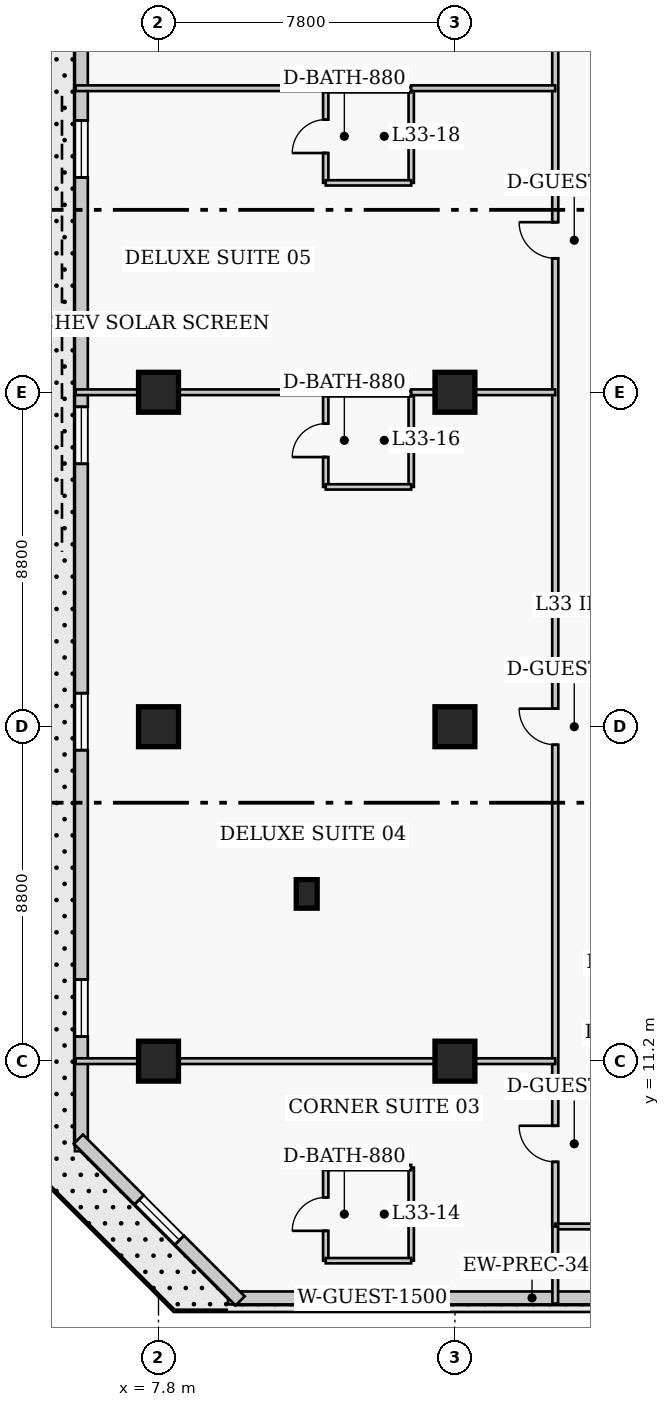
"""IFC4 building model, lengths in metres.
Left out: names, types, materials, properties, quantities, classifications, styles, units other than length and angle.
Written with IfcOpenShell. Run it as: python <this file> out.ifc"""

import sys

from ifc_helpers import new_model, si_unit, direction, frame, frame_2d, origin, origin_2d, place, context, subcontext, project, spatial, rectangle, extrude, element, fill, save


model = new_model("IFC4")
c1 = context("Model", 3, precision=1e-05, world=origin(), true_north=direction((0.0, 1.0)))
c2 = subcontext(c1, "Body", "Model", "MODEL_VIEW")
j1 = project(units=[si_unit("LENGTHUNIT", "METRE"), si_unit("PLANEANGLEUNIT", "RADIAN")], contexts=[c1])
p1 = place(None, origin())
s1 = spatial("IfcSite", under=j1, at=p1, CompositionType="ELEMENT")
p2 = place(p1, origin())
s2 = spatial("IfcBuilding", under=s1, at=p2, CompositionType="ELEMENT")
p3 = place(p2, frame((0.0, 0.0, 134.6)))
s3 = spatial("IfcBuildingStorey", under=s2, at=p3, CompositionType="ELEMENT", Elevation=134.6)
for number, where, z_axis, x_axis in (
    (1, (7.8, 11.2, 0.0), (0.0, 0.0, 1.0), (1.0, 0.0, 0.0)),
    (2, (7.8, 20.0, 0.0), (0.0, 0.0, 1.0), (1.0, 0.0, 0.0)),
    (3, (7.8, 28.8, 0.0), (0.0, 0.0, 1.0), (1.0, 0.0, 0.0)),
    (4, (15.6, 11.2, 0.0), (0.0, 0.0, 1.0), (1.0, 0.0, 0.0)),
    (5, (15.6, 20.0, 0.0), (0.0, 0.0, 1.0), (1.0, 0.0, 0.0)),
    (6, (15.6, 28.8, 0.0), (0.0, 0.0, 1.0), (1.0, 0.0, 0.0)),
):
    element("IfcColumn", number, at=place(p3, frame(where, z_axis=z_axis, x_axis=x_axis)), inside=s3, PredefinedType="COLUMN", context=c2, shape_type="SweptSolid", body=[
        extrude(rectangle(XDim=1.05, YDim=1.05, at=origin_2d()), origin(), (0.0, 0.0, 1.0), 3.8),
    ])
p4 = place(p3, frame((11.7, 15.6, 0.0), z_axis=(0.0, 0.0, 1.0), x_axis=(1.0, 0.0, 0.0)))
e7 = element("IfcColumn", 7, at=p4, inside=s3, PredefinedType="PILASTER", context=c2, shape_type="SweptSolid", body=[
    extrude(rectangle(XDim=0.55, YDim=0.75, at=origin_2d()), origin(), (0.0, 0.0, 1.0), 3.8),
])
p5 = place(p3, frame((9.63, 4.97, 0.0), z_axis=(0.0, 0.0, 1.0), x_axis=(1.0, 0.0, 0.0)))
e8 = element("IfcWall", 8, at=p5, inside=s3, PredefinedType="SOLIDWALL", context=c2, shape_type="SweptSolid", body=[
    extrude(rectangle(XDim=26.69, YDim=0.34, at=frame_2d((13.345, 0.0))), origin(), (0.0, 0.0, 1.0), 3.55),
])
p6 = place(p5, frame((3.048, 0.0, 0.85)))
e9 = element("IfcOpeningElement", 9, at=p6, cuts=e8, PredefinedType="OPENING", context=c2, shape_type="SweptSolid", body=[
    extrude(rectangle(XDim=1.5, YDim=1.75, at=frame_2d((0.75, 0.875))), frame((0.0, 0.18, 0.0), z_axis=(0.0, -1.0, 0.0), x_axis=(1.0, 0.0, 0.0)), (0.0, 0.0, 1.0), 0.36),
])
p7 = place(p5, frame((22.642, 0.0, 0.85)))
e10 = element("IfcOpeningElement", 10, at=p7, cuts=e8, PredefinedType="OPENING", context=c2, shape_type="SweptSolid", body=[
    extrude(rectangle(XDim=1.5, YDim=1.75, at=frame_2d((0.75, 0.875))), frame((0.0, 0.18, 0.0), z_axis=(0.0, -1.0, 0.0), x_axis=(1.0, 0.0, 0.0)), (0.0, 0.0, 1.0), 0.36),
])
p8 = place(p5, frame((11.45, 0.0, 0.85)))
e11 = element("IfcOpeningElement", 11, at=p8, cuts=e8, PredefinedType="OPENING", context=c2, shape_type="SweptSolid", body=[
    extrude(rectangle(XDim=1.3, YDim=1.7, at=frame_2d((0.65, 0.85))), frame((0.0, 0.18, 0.0), z_axis=(0.0, -1.0, 0.0), x_axis=(1.0, 0.0, 0.0)), (0.0, 0.0, 1.0), 0.36),
])
p9 = place(p5, frame((17.955, 0.0, 0.85)))
e12 = element("IfcOpeningElement", 12, at=p9, cuts=e8, PredefinedType="OPENING", context=c2, shape_type="SweptSolid", body=[
    extrude(rectangle(XDim=1.3, YDim=1.7, at=frame_2d((0.65, 0.85))), frame((0.0, 0.18, 0.0), z_axis=(0.0, -1.0, 0.0), x_axis=(1.0, 0.0, 0.0)), (0.0, 0.0, 1.0), 0.36),
])
p10 = place(p3, frame((5.77, 38.97, 0.0), z_axis=(0.0, 0.0, 1.0), x_axis=(0.0, -1.0, 0.0)))
e13 = element("IfcWall", 13, at=p10, inside=s3, PredefinedType="SOLIDWALL", context=c2, shape_type="SweptSolid", body=[
    extrude(rectangle(XDim=30.14, YDim=0.34, at=frame_2d((15.07, 0.0))), origin(), (0.0, 0.0, 1.0), 3.55),
])
p11 = place(p10, frame((3.018, 0.0, 0.85)))
e14 = element("IfcOpeningElement", 14, at=p11, cuts=e13, PredefinedType="OPENING", context=c2, shape_type="SweptSolid", body=[
    extrude(rectangle(XDim=1.5, YDim=1.75, at=frame_2d((0.75, 0.875))), frame((0.0, 0.18, 0.0), z_axis=(0.0, -1.0, 0.0), x_axis=(1.0, 0.0, 0.0)), (0.0, 0.0, 1.0), 0.36),
])
p12 = place(p10, frame((10.552, 0.0, 0.85)))
e15 = element("IfcOpeningElement", 15, at=p12, cuts=e13, PredefinedType="OPENING", context=c2, shape_type="SweptSolid", body=[
    extrude(rectangle(XDim=1.5, YDim=1.75, at=frame_2d((0.75, 0.875))), frame((0.0, 0.18, 0.0), z_axis=(0.0, -1.0, 0.0), x_axis=(1.0, 0.0, 0.0)), (0.0, 0.0, 1.0), 0.36),
])
p13 = place(p10, frame((18.087, 0.0, 0.85)))
e16 = element("IfcOpeningElement", 16, at=p13, cuts=e13, PredefinedType="OPENING", context=c2, shape_type="SweptSolid", body=[
    extrude(rectangle(XDim=1.5, YDim=1.75, at=frame_2d((0.75, 0.875))), frame((0.0, 0.18, 0.0), z_axis=(0.0, -1.0, 0.0), x_axis=(1.0, 0.0, 0.0)), (0.0, 0.0, 1.0), 0.36),
])
p14 = place(p10, frame((25.623, 0.0, 0.85)))
e17 = element("IfcOpeningElement", 17, at=p14, cuts=e13, PredefinedType="OPENING", context=c2, shape_type="SweptSolid", body=[
    extrude(rectangle(XDim=1.5, YDim=1.75, at=frame_2d((0.75, 0.875))), frame((0.0, 0.18, 0.0), z_axis=(0.0, -1.0, 0.0), x_axis=(1.0, 0.0, 0.0)), (0.0, 0.0, 1.0), 0.36),
])
p15 = place(p3, frame((5.692, 9.148, 0.0), z_axis=(0.0, 0.0, 1.0), x_axis=(0.707106781187, -0.707106781187, 0.0)))
e18 = element("IfcWall", 18, at=p15, inside=s3, PredefinedType="SOLIDWALL", context=c2, shape_type="SweptSolid", body=[
    extrude(rectangle(XDim=6.02, YDim=0.34, at=frame_2d((3.01, 0.0))), origin(), (0.0, 0.0, 1.0), 3.55),
])
p16 = place(p15, frame((2.26, 0.0, 0.85)))
e19 = element("IfcOpeningElement", 19, at=p16, cuts=e18, PredefinedType="OPENING", context=c2, shape_type="SweptSolid", body=[
    extrude(rectangle(XDim=1.5, YDim=1.75, at=frame_2d((0.75, 0.875))), frame((0.0, 0.18, 0.0), z_axis=(0.0, -1.0, 0.0), x_axis=(1.0, 0.0, 0.0)), (0.0, 0.0, 1.0), 0.36),
])
p17 = place(p3, frame((18.24, 6.85, 0.0), z_axis=(0.0, 0.0, 1.0), x_axis=(0.0, 1.0, 0.0)))
e20 = element("IfcWall", 20, at=p17, inside=s3, PredefinedType="PARTITIONING", context=c2, shape_type="SweptSolid", body=[
    extrude(rectangle(XDim=33.8, YDim=0.16, at=frame_2d((16.9, 0.0))), origin(), (0.0, 0.0, 1.0), 3.55),
])
p18 = place(p17, frame((1.7, 0.0, 0.0)))
e21 = element("IfcOpeningElement", 21, at=p18, cuts=e20, PredefinedType="OPENING", context=c2, shape_type="SweptSolid", body=[
    extrude(rectangle(XDim=0.95, YDim=2.1, at=frame_2d((0.475, 1.05))), frame((0.0, 0.09, 0.0), z_axis=(0.0, -1.0, 0.0), x_axis=(1.0, 0.0, 0.0)), (0.0, 0.0, 1.0), 0.18),
])
p19 = place(p17, frame((12.675, 0.0, 0.0)))
e22 = element("IfcOpeningElement", 22, at=p19, cuts=e20, PredefinedType="OPENING", context=c2, shape_type="SweptSolid", body=[
    extrude(rectangle(XDim=0.95, YDim=2.1, at=frame_2d((0.475, 1.05))), frame((0.0, 0.09, 0.0), z_axis=(0.0, -1.0, 0.0), x_axis=(1.0, 0.0, 0.0)), (0.0, 0.0, 1.0), 0.18),
])
p20 = place(p17, frame((25.475, 0.0, 0.0)))
e23 = element("IfcOpeningElement", 23, at=p20, cuts=e20, PredefinedType="OPENING", context=c2, shape_type="SweptSolid", body=[
    extrude(rectangle(XDim=0.95, YDim=2.1, at=frame_2d((0.475, 1.05))), frame((0.0, 0.09, 0.0), z_axis=(0.0, -1.0, 0.0), x_axis=(1.0, 0.0, 0.0)), (0.0, 0.0, 1.0), 0.18),
])
p21 = place(p17, frame((31.43, 0.0, 0.0)))
e24 = element("IfcOpeningElement", 24, at=p21, cuts=e20, PredefinedType="OPENING", context=c2, shape_type="SweptSolid", body=[
    extrude(rectangle(XDim=1.0, YDim=2.15, at=frame_2d((0.5, 1.075))), frame((0.0, 0.09, 0.0), z_axis=(0.0, -1.0, 0.0), x_axis=(1.0, 0.0, 0.0)), (0.0, 0.0, 1.0), 0.18),
])
p22 = place(p3, frame((18.24, 6.85, 0.0), z_axis=(0.0, 0.0, 1.0), x_axis=(1.0, 0.0, 0.0)))
e25 = element("IfcWall", 25, at=p22, inside=s3, PredefinedType="PARTITIONING", context=c2, shape_type="SweptSolid", body=[
    extrude(rectangle(XDim=2.22, YDim=0.15, at=frame_2d((1.11, 0.0))), origin(), (0.0, 0.0, 1.0), 3.55),
])
p23 = place(p3, frame((18.24, 4.82, 0.0), z_axis=(0.0, 0.0, 1.0), x_axis=(0.0, 1.0, 0.0)))
e26 = element("IfcWall", 26, at=p23, inside=s3, PredefinedType="PARTITIONING", context=c2, shape_type="SweptSolid", body=[
    extrude(rectangle(XDim=2.03, YDim=0.15, at=frame_2d((1.015, 0.0))), origin(), (0.0, 0.0, 1.0), 3.55),
])
p24 = place(p3, frame((12.2, 5.95, 0.0), z_axis=(0.0, 0.0, 1.0), x_axis=(0.0, 1.0, 0.0)))
e27 = element("IfcWall", 27, at=p24, inside=s3, PredefinedType="PLUMBINGWALL", context=c2, shape_type="SweptSolid", body=[
    extrude(rectangle(XDim=2.45, YDim=0.14, at=frame_2d((1.225, 0.0))), origin(), (0.0, 0.0, 1.0), 3.55),
])
p25 = place(p24, frame((0.785, 0.0, 0.0)))
e28 = element("IfcOpeningElement", 28, at=p25, cuts=e27, PredefinedType="OPENING", context=c2, shape_type="SweptSolid", body=[
    extrude(rectangle(XDim=0.88, YDim=2.05, at=frame_2d((0.44, 1.025))), frame((0.0, 0.08, 0.0), z_axis=(0.0, -1.0, 0.0), x_axis=(1.0, 0.0, 0.0)), (0.0, 0.0, 1.0), 0.16),
])
p26 = place(p3, frame((14.45, 5.95, 0.0), z_axis=(0.0, 0.0, 1.0), x_axis=(0.0, 1.0, 0.0)))
e29 = element("IfcWall", 29, at=p26, inside=s3, PredefinedType="PLUMBINGWALL", context=c2, shape_type="SweptSolid", body=[
    extrude(rectangle(XDim=2.45, YDim=0.14, at=frame_2d((1.225, 0.0))), origin(), (0.0, 0.0, 1.0), 3.55),
])
for number, where, z_axis, x_axis in (
    (30, (12.2, 5.95, 0.0), (0.0, 0.0, 1.0), (1.0, 0.0, 0.0)),
    (31, (12.2, 8.4, 0.0), (0.0, 0.0, 1.0), (1.0, 0.0, 0.0)),
):
    element("IfcWall", number, at=place(p3, frame(where, z_axis=z_axis, x_axis=x_axis)), inside=s3, PredefinedType="PLUMBINGWALL", context=c2, shape_type="SweptSolid", body=[
        extrude(rectangle(XDim=2.25, YDim=0.14, at=frame_2d((1.125, 0.0))), origin(), (0.0, 0.0, 1.0), 3.55),
    ])
p27 = place(p3, frame((5.62, 11.2, 0.0), z_axis=(0.0, 0.0, 1.0), x_axis=(1.0, 0.0, 0.0)))
e32 = element("IfcWall", 32, at=p27, inside=s3, PredefinedType="PARTITIONING", context=c2, shape_type="SweptSolid", body=[
    extrude(rectangle(XDim=12.62, YDim=0.15, at=frame_2d((6.31, 0.0))), origin(), (0.0, 0.0, 1.0), 2.778),
])
p28 = place(p3, frame((12.2, 26.31, 0.0), z_axis=(0.0, 0.0, 1.0), x_axis=(0.0, 1.0, 0.0)))
e33 = element("IfcWall", 33, at=p28, inside=s3, PredefinedType="PLUMBINGWALL", context=c2, shape_type="SweptSolid", body=[
    extrude(rectangle(XDim=2.45, YDim=0.14, at=frame_2d((1.225, 0.0))), origin(), (0.0, 0.0, 1.0), 3.55),
])
p29 = place(p28, frame((0.785, 0.0, 0.0)))
e34 = element("IfcOpeningElement", 34, at=p29, cuts=e33, PredefinedType="OPENING", context=c2, shape_type="SweptSolid", body=[
    extrude(rectangle(XDim=0.88, YDim=2.05, at=frame_2d((0.44, 1.025))), frame((0.0, 0.08, 0.0), z_axis=(0.0, -1.0, 0.0), x_axis=(1.0, 0.0, 0.0)), (0.0, 0.0, 1.0), 0.16),
])
p30 = place(p3, frame((14.45, 26.31, 0.0), z_axis=(0.0, 0.0, 1.0), x_axis=(0.0, 1.0, 0.0)))
e35 = element("IfcWall", 35, at=p30, inside=s3, PredefinedType="PLUMBINGWALL", context=c2, shape_type="SweptSolid", body=[
    extrude(rectangle(XDim=2.45, YDim=0.14, at=frame_2d((1.225, 0.0))), origin(), (0.0, 0.0, 1.0), 3.55),
])
p31 = place(p3, frame((12.2, 26.31, 0.0), z_axis=(0.0, 0.0, 1.0), x_axis=(1.0, 0.0, 0.0)))
e36 = element("IfcWall", 36, at=p31, inside=s3, PredefinedType="PLUMBINGWALL", context=c2, shape_type="SweptSolid", body=[
    extrude(rectangle(XDim=2.25, YDim=0.14, at=frame_2d((1.125, 0.0))), origin(), (0.0, 0.0, 1.0), 3.55),
])
p32 = place(p3, frame((12.2, 28.76, 0.0), z_axis=(0.0, 0.0, 1.0), x_axis=(1.0, 0.0, 0.0)))
e37 = element("IfcWall", 37, at=p32, inside=s3, PredefinedType="PLUMBINGWALL", context=c2, shape_type="SweptSolid", body=[
    extrude(rectangle(XDim=2.25, YDim=0.14, at=frame_2d((1.125, 0.0))), origin(), (0.0, 0.0, 1.0), 2.9),
])
p33 = place(p3, frame((5.62, 28.8, 0.0), z_axis=(0.0, 0.0, 1.0), x_axis=(1.0, 0.0, 0.0)))
e38 = element("IfcWall", 38, at=p33, inside=s3, PredefinedType="PARTITIONING", context=c2, shape_type="SweptSolid", body=[
    extrude(rectangle(XDim=6.58, YDim=0.15, at=frame_2d((3.29, 0.0))), origin(), (0.0, 0.0, 1.0), 2.778),
])
p34 = place(p3, frame((14.45, 28.8, 0.0), z_axis=(0.0, 0.0, 1.0), x_axis=(1.0, 0.0, 0.0)))
e39 = element("IfcWall", 39, at=p34, inside=s3, PredefinedType="PARTITIONING", context=c2, shape_type="SweptSolid", body=[
    extrude(rectangle(XDim=3.79, YDim=0.15, at=frame_2d((1.895, 0.0))), origin(), (0.0, 0.0, 1.0), 2.778),
])
p35 = place(p3, frame((12.2, 34.31, 0.0), z_axis=(0.0, 0.0, 1.0), x_axis=(0.0, 1.0, 0.0)))
e40 = element("IfcWall", 40, at=p35, inside=s3, PredefinedType="PLUMBINGWALL", context=c2, shape_type="SweptSolid", body=[
    extrude(rectangle(XDim=2.45, YDim=0.14, at=frame_2d((1.225, 0.0))), origin(), (0.0, 0.0, 1.0), 3.55),
])
p36 = place(p35, frame((0.785, 0.0, 0.0)))
e41 = element("IfcOpeningElement", 41, at=p36, cuts=e40, PredefinedType="OPENING", context=c2, shape_type="SweptSolid", body=[
    extrude(rectangle(XDim=0.88, YDim=2.05, at=frame_2d((0.44, 1.025))), frame((0.0, 0.08, 0.0), z_axis=(0.0, -1.0, 0.0), x_axis=(1.0, 0.0, 0.0)), (0.0, 0.0, 1.0), 0.16),
])
p37 = place(p3, frame((14.45, 34.31, 0.0), z_axis=(0.0, 0.0, 1.0), x_axis=(0.0, 1.0, 0.0)))
e42 = element("IfcWall", 42, at=p37, inside=s3, PredefinedType="PLUMBINGWALL", context=c2, shape_type="SweptSolid", body=[
    extrude(rectangle(XDim=2.45, YDim=0.14, at=frame_2d((1.225, 0.0))), origin(), (0.0, 0.0, 1.0), 3.55),
])
for number, where, z_axis, x_axis in (
    (43, (12.2, 34.31, 0.0), (0.0, 0.0, 1.0), (1.0, 0.0, 0.0)),
    (44, (12.2, 36.76, 0.0), (0.0, 0.0, 1.0), (1.0, 0.0, 0.0)),
):
    element("IfcWall", number, at=place(p3, frame(where, z_axis=z_axis, x_axis=x_axis)), inside=s3, PredefinedType="PLUMBINGWALL", context=c2, shape_type="SweptSolid", body=[
        extrude(rectangle(XDim=2.25, YDim=0.14, at=frame_2d((1.125, 0.0))), origin(), (0.0, 0.0, 1.0), 3.55),
    ])
p38 = place(p3, frame((5.62, 36.8, 0.0), z_axis=(0.0, 0.0, 1.0), x_axis=(1.0, 0.0, 0.0)))
e45 = element("IfcWall", 45, at=p38, inside=s3, PredefinedType="PARTITIONING", context=c2, shape_type="SweptSolid", body=[
    extrude(rectangle(XDim=6.58, YDim=0.15, at=frame_2d((3.29, 0.0))), origin(), (0.0, 0.0, 1.0), 3.55),
])
p39 = place(p3, frame((14.45, 36.8, 0.0), z_axis=(0.0, 0.0, 1.0), x_axis=(1.0, 0.0, 0.0)))
e46 = element("IfcWall", 46, at=p39, inside=s3, PredefinedType="PARTITIONING", context=c2, shape_type="SweptSolid", body=[
    extrude(rectangle(XDim=3.79, YDim=0.15, at=frame_2d((1.895, 0.0))), origin(), (0.0, 0.0, 1.0), 3.55),
])
p40 = place(p6, origin())
e47 = element("IfcWindow", 47, at=p40, inside=s3, PartitioningType="SINGLE_PANEL", PredefinedType="WINDOW", context=c2, shape_type="SweptSolid", body=[
    extrude(rectangle(XDim=1.5, YDim=1.75, at=frame_2d((0.75, 0.875))), frame((0.0, 0.03, 0.0), z_axis=(0.0, -1.0, 0.0), x_axis=(1.0, 0.0, 0.0)), (0.0, 0.0, 1.0), 0.06),
])
fill(e9, e47)
p41 = place(p11, origin())
e48 = element("IfcWindow", 48, at=p41, inside=s3, PartitioningType="SINGLE_PANEL", PredefinedType="WINDOW", context=c2, shape_type="SweptSolid", body=[
    extrude(rectangle(XDim=1.5, YDim=1.75, at=frame_2d((0.75, 0.875))), frame((0.0, 0.03, 0.0), z_axis=(0.0, -1.0, 0.0), x_axis=(1.0, 0.0, 0.0)), (0.0, 0.0, 1.0), 0.06),
])
fill(e14, e48)
p42 = place(p12, origin())
e49 = element("IfcWindow", 49, at=p42, inside=s3, PartitioningType="SINGLE_PANEL", PredefinedType="WINDOW", context=c2, shape_type="SweptSolid", body=[
    extrude(rectangle(XDim=1.5, YDim=1.75, at=frame_2d((0.75, 0.875))), frame((0.0, 0.03, 0.0), z_axis=(0.0, -1.0, 0.0), x_axis=(1.0, 0.0, 0.0)), (0.0, 0.0, 1.0), 0.06),
])
fill(e15, e49)
p43 = place(p13, origin())
e50 = element("IfcWindow", 50, at=p43, inside=s3, PartitioningType="SINGLE_PANEL", PredefinedType="WINDOW", context=c2, shape_type="SweptSolid", body=[
    extrude(rectangle(XDim=1.5, YDim=1.75, at=frame_2d((0.75, 0.875))), frame((0.0, 0.03, 0.0), z_axis=(0.0, -1.0, 0.0), x_axis=(1.0, 0.0, 0.0)), (0.0, 0.0, 1.0), 0.06),
])
fill(e16, e50)
p44 = place(p14, origin())
e51 = element("IfcWindow", 51, at=p44, inside=s3, PartitioningType="SINGLE_PANEL", PredefinedType="WINDOW", context=c2, shape_type="SweptSolid", body=[
    extrude(rectangle(XDim=1.5, YDim=1.75, at=frame_2d((0.75, 0.875))), frame((0.0, 0.03, 0.0), z_axis=(0.0, -1.0, 0.0), x_axis=(1.0, 0.0, 0.0)), (0.0, 0.0, 1.0), 0.06),
])
fill(e17, e51)
p45 = place(p16, origin())
e52 = element("IfcWindow", 52, at=p45, inside=s3, PartitioningType="SINGLE_PANEL", PredefinedType="WINDOW", context=c2, shape_type="SweptSolid", body=[
    extrude(rectangle(XDim=1.5, YDim=1.75, at=frame_2d((0.75, 0.875))), frame((0.0, 0.03, 0.0), z_axis=(0.0, -1.0, 0.0), x_axis=(1.0, 0.0, 0.0)), (0.0, 0.0, 1.0), 0.06),
])
fill(e19, e52)
p46 = place(p25, origin())
e53 = element("IfcDoor", 53, at=p46, inside=s3, OperationType="SINGLE_SWING_LEFT", PredefinedType="DOOR", context=c2, shape_type="SweptSolid", body=[
    extrude(rectangle(XDim=0.88, YDim=2.05, at=frame_2d((0.44, 1.025))), frame((0.0, 0.025, 0.0), z_axis=(0.0, -1.0, 0.0), x_axis=(1.0, 0.0, 0.0)), (0.0, 0.0, 1.0), 0.05),
])
fill(e28, e53)
p47 = place(p18, origin())
e54 = element("IfcDoor", 54, at=p47, inside=s3, OperationType="SINGLE_SWING_RIGHT", PredefinedType="DOOR", context=c2, shape_type="SweptSolid", body=[
    extrude(rectangle(XDim=0.95, YDim=2.1, at=frame_2d((0.475, 1.05))), frame((0.0, 0.025, 0.0), z_axis=(0.0, -1.0, 0.0), x_axis=(1.0, 0.0, 0.0)), (0.0, 0.0, 1.0), 0.05),
])
fill(e21, e54)
p48 = place(p29, origin())
e55 = element("IfcDoor", 55, at=p48, inside=s3, OperationType="SINGLE_SWING_LEFT", PredefinedType="DOOR", context=c2, shape_type="SweptSolid", body=[
    extrude(rectangle(XDim=0.88, YDim=2.05, at=frame_2d((0.44, 1.025))), frame((0.0, 0.025, 0.0), z_axis=(0.0, -1.0, 0.0), x_axis=(1.0, 0.0, 0.0)), (0.0, 0.0, 1.0), 0.05),
])
fill(e34, e55)
p49 = place(p19, origin())
e56 = element("IfcDoor", 56, at=p49, inside=s3, OperationType="SINGLE_SWING_RIGHT", PredefinedType="DOOR", context=c2, shape_type="SweptSolid", body=[
    extrude(rectangle(XDim=0.95, YDim=2.1, at=frame_2d((0.475, 1.05))), frame((0.0, 0.025, 0.0), z_axis=(0.0, -1.0, 0.0), x_axis=(1.0, 0.0, 0.0)), (0.0, 0.0, 1.0), 0.05),
])
fill(e22, e56)
p50 = place(p36, origin())
e57 = element("IfcDoor", 57, at=p50, inside=s3, OperationType="SINGLE_SWING_LEFT", PredefinedType="DOOR", context=c2, shape_type="SweptSolid", body=[
    extrude(rectangle(XDim=0.88, YDim=2.05, at=frame_2d((0.44, 1.025))), frame((0.0, 0.025, 0.0), z_axis=(0.0, -1.0, 0.0), x_axis=(1.0, 0.0, 0.0)), (0.0, 0.0, 1.0), 0.05),
])
fill(e41, e57)
p51 = place(p20, origin())
e58 = element("IfcDoor", 58, at=p51, inside=s3, OperationType="SINGLE_SWING_RIGHT", PredefinedType="DOOR", context=c2, shape_type="SweptSolid", body=[
    extrude(rectangle(XDim=0.95, YDim=2.1, at=frame_2d((0.475, 1.05))), frame((0.0, 0.025, 0.0), z_axis=(0.0, -1.0, 0.0), x_axis=(1.0, 0.0, 0.0)), (0.0, 0.0, 1.0), 0.05),
])
fill(e23, e58)
save(model, sys.argv[1])
